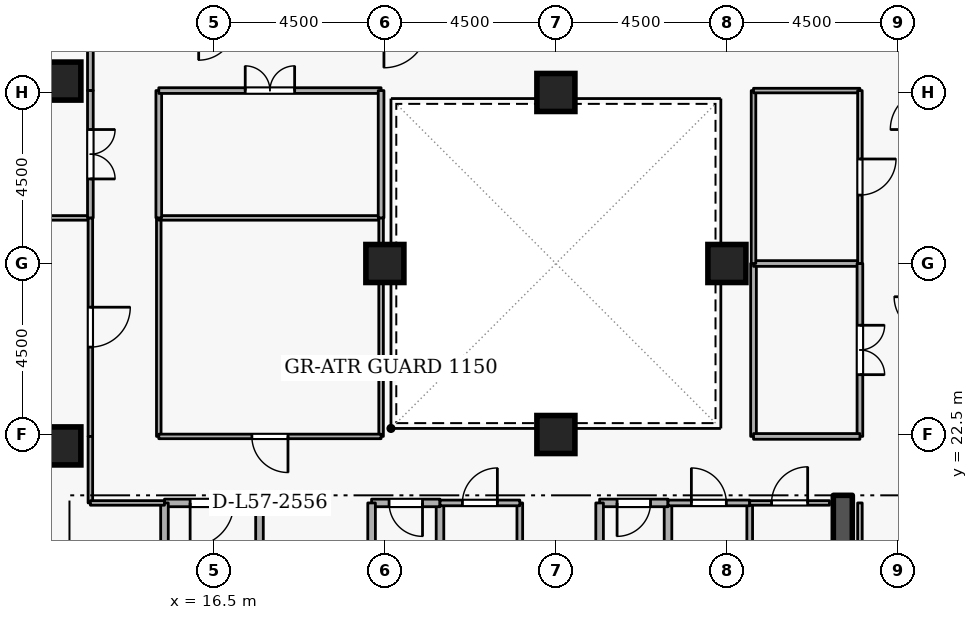
"""IFC4 building model, lengths in metres.
Left out: names, types, materials, properties, quantities, classifications, styles, units other than length and angle.
Written with IfcOpenShell. Run it as: python <this file> out.ifc"""

import sys

from ifc_helpers import new_model, si_unit, direction, frame, frame_2d, origin, origin_2d, place, context, subcontext, project, spatial, rectangle, extrude, element, fill, save


model = new_model("IFC4")
c1 = context("Model", 3, precision=1e-05, world=origin(), true_north=direction((0.0, 1.0)))
c2 = subcontext(c1, "Body", "Model", "MODEL_VIEW")
j1 = project(units=[si_unit("LENGTHUNIT", "METRE"), si_unit("PLANEANGLEUNIT", "RADIAN")], contexts=[c1])
p1 = place(None, origin())
s1 = spatial("IfcSite", under=j1, at=p1, CompositionType="ELEMENT")
p2 = place(p1, origin())
s2 = spatial("IfcBuilding", under=s1, at=p2, CompositionType="ELEMENT")
p3 = place(p2, frame((0.0, 0.0, 214.5)))
s3 = spatial("IfcBuildingStorey", under=s2, at=p3, CompositionType="ELEMENT", Elevation=214.5)
p4 = place(p3, frame((33.05, 15.1, 0.0), z_axis=(0.0, 0.0, 1.0), x_axis=(0.0, 1.0, 0.0)))
e1 = element("IfcWall", 1, at=p4, inside=s3, PredefinedType="SHEAR", context=c2, shape_type="SweptSolid", body=[
    extrude(rectangle(XDim=5.8, YDim=0.5, at=frame_2d((2.9, 0.0))), origin(), (0.0, 0.0, 1.0), 3.6),
])
for number, where, z_axis, x_axis in (
    (2, (12.5, 22.2, 0.0), (0.0, 0.0, 1.0), (1.0, 0.0, 0.0)),
    (3, (12.5, 31.8, 0.0), (0.0, 0.0, 1.0), (1.0, 0.0, 0.0)),
    (4, (25.5, 22.5, 0.0), (0.0, 0.0, 1.0), (1.0, 0.0, 0.0)),
    (5, (25.5, 31.5, 0.0), (0.0, 0.0, 1.0), (1.0, 0.0, 0.0)),
    (6, (21.0, 27.0, 0.0), (0.0, 0.0, 1.0), (1.0, 0.0, 0.0)),
    (7, (30.0, 27.0, 0.0), (0.0, 0.0, 1.0), (1.0, 0.0, 0.0)),
):
    element("IfcColumn", number, at=place(p3, frame(where, z_axis=z_axis, x_axis=x_axis)), inside=s3, PredefinedType="COLUMN", context=c2, shape_type="SweptSolid", body=[
        extrude(rectangle(XDim=1.0, YDim=1.0, at=origin_2d()), origin(), (0.0, 0.0, 1.0), 3.6),
    ])
p5 = place(p3, frame((17.7, 18.4, 0.0), z_axis=(0.0, 0.0, 1.0), x_axis=(0.0, 1.0, 0.0)))
e8 = element("IfcWall", 8, at=p5, inside=s3, PredefinedType="STANDARD", context=c2, shape_type="SweptSolid", body=[
    extrude(rectangle(XDim=2.3, YDim=0.2, at=frame_2d((1.15, 0.0))), origin(), (0.0, 0.0, 1.0), 2.545),
])
p6 = place(p3, frame((17.7, 20.7, 0.0), z_axis=(0.0, 0.0, 1.0), x_axis=(-1.0, 0.0, 0.0)))
e9 = element("IfcWall", 9, at=p6, inside=s3, PredefinedType="STANDARD", context=c2, shape_type="SweptSolid", body=[
    extrude(rectangle(XDim=2.5, YDim=0.2, at=frame_2d((1.25, 0.0))), origin(), (0.0, 0.0, 1.0), 3.34),
])
p7 = place(p6, frame((0.675, 0.0, 0.0)))
e10 = element("IfcOpeningElement", 10, at=p7, cuts=e9, PredefinedType="OPENING", context=c2, shape_type="SweptSolid", body=[
    extrude(rectangle(XDim=1.15, YDim=2.1, at=frame_2d((0.575, 1.05))), frame((0.0, 0.11, 0.0), z_axis=(0.0, -1.0, 0.0), x_axis=(1.0, 0.0, 0.0)), (0.0, 0.0, 1.0), 0.22),
])
p8 = place(p3, frame((15.2, 20.7, 0.0), z_axis=(0.0, 0.0, 1.0), x_axis=(0.0, -1.0, 0.0)))
e11 = element("IfcWall", 11, at=p8, inside=s3, PredefinedType="STANDARD", context=c2, shape_type="SweptSolid", body=[
    extrude(rectangle(XDim=5.7, YDim=0.2, at=frame_2d((2.85, 0.0))), origin(), (0.0, 0.0, 1.0), 3.34),
])
p9 = place(p3, frame((28.45, 18.65, 0.0), z_axis=(0.0, 0.0, 1.0), x_axis=(0.0, 1.0, 0.0)))
e12 = element("IfcWall", 12, at=p9, inside=s3, PredefinedType="STANDARD", context=c2, shape_type="SweptSolid", body=[
    extrude(rectangle(XDim=2.05, YDim=0.2, at=frame_2d((1.025, 0.0))), origin(), (0.0, 0.0, 1.0), 3.34),
])
p10 = place(p3, frame((28.45, 20.7, 0.0), z_axis=(0.0, 0.0, 1.0), x_axis=(-1.0, 0.0, 0.0)))
e13 = element("IfcWall", 13, at=p10, inside=s3, PredefinedType="STANDARD", context=c2, shape_type="SweptSolid", body=[
    extrude(rectangle(XDim=1.8, YDim=0.2, at=frame_2d((0.9, 0.0))), origin(), (0.0, 0.0, 1.0), 3.34),
])
p11 = place(p10, frame((0.46, 0.0, 0.0)))
e14 = element("IfcOpeningElement", 14, at=p11, cuts=e13, PredefinedType="OPENING", context=c2, shape_type="SweptSolid", body=[
    extrude(rectangle(XDim=0.88, YDim=2.04, at=frame_2d((0.44, 1.02))), frame((0.0, 0.11, 0.0), z_axis=(0.0, -1.0, 0.0), x_axis=(1.0, 0.0, 0.0)), (0.0, 0.0, 1.0), 0.22),
])
for number, where, z_axis, x_axis in (
    (15, (26.65, 20.7, 0.0), (0.0, 0.0, 1.0), (0.0, -1.0, 0.0)),
    (16, (22.45, 18.65, 0.0), (0.0, 0.0, 1.0), (0.0, 1.0, 0.0)),
):
    element("IfcWall", number, at=place(p3, frame(where, z_axis=z_axis, x_axis=x_axis)), inside=s3, PredefinedType="STANDARD", context=c2, shape_type="SweptSolid", body=[
        extrude(rectangle(XDim=2.05, YDim=0.2, at=frame_2d((1.025, 0.0))), origin(), (0.0, 0.0, 1.0), 3.34),
    ])
p12 = place(p3, frame((22.45, 20.7, 0.0), z_axis=(0.0, 0.0, 1.0), x_axis=(-1.0, 0.0, 0.0)))
e17 = element("IfcWall", 17, at=p12, inside=s3, PredefinedType="STANDARD", context=c2, shape_type="SweptSolid", body=[
    extrude(rectangle(XDim=1.8, YDim=0.2, at=frame_2d((0.9, 0.0))), origin(), (0.0, 0.0, 1.0), 3.34),
])
p13 = place(p12, frame((0.46, 0.0, 0.0)))
e18 = element("IfcOpeningElement", 18, at=p13, cuts=e17, PredefinedType="OPENING", context=c2, shape_type="SweptSolid", body=[
    extrude(rectangle(XDim=0.88, YDim=2.04, at=frame_2d((0.44, 1.02))), frame((0.0, 0.11, 0.0), z_axis=(0.0, -1.0, 0.0), x_axis=(1.0, 0.0, 0.0)), (0.0, 0.0, 1.0), 0.22),
])
p14 = place(p3, frame((20.65, 20.7, 0.0), z_axis=(0.0, 0.0, 1.0), x_axis=(0.0, -1.0, 0.0)))
e19 = element("IfcWall", 19, at=p14, inside=s3, PredefinedType="STANDARD", context=c2, shape_type="SweptSolid", body=[
    extrude(rectangle(XDim=2.05, YDim=0.2, at=frame_2d((1.025, 0.0))), origin(), (0.0, 0.0, 1.0), 3.34),
])
p15 = place(p3, frame((24.55, 20.7, 0.0), z_axis=(0.0, 0.0, 1.0), x_axis=(0.0, -1.0, 0.0)))
e20 = element("IfcWall", 20, at=p15, inside=s3, PredefinedType="PARTITIONING", context=c2, shape_type="SweptSolid", body=[
    extrude(rectangle(XDim=2.05, YDim=0.15, at=frame_2d((1.025, 0.0))), origin(), (0.0, 0.0, 1.0), 3.34),
])
p16 = place(p3, frame((22.45, 20.7, 0.0), z_axis=(0.0, 0.0, 1.0), x_axis=(1.0, 0.0, 0.0)))
e21 = element("IfcWall", 21, at=p16, inside=s3, PredefinedType="PARTITIONING", context=c2, shape_type="SweptSolid", body=[
    extrude(rectangle(XDim=2.1, YDim=0.15, at=frame_2d((1.05, 0.0))), origin(), (0.0, 0.0, 1.0), 3.34),
])
p17 = place(p16, frame((0.59, 0.0, 0.0)))
e22 = element("IfcOpeningElement", 22, at=p17, cuts=e21, PredefinedType="OPENING", context=c2, shape_type="SweptSolid", body=[
    extrude(rectangle(XDim=0.92, YDim=2.08, at=frame_2d((0.46, 1.04))), frame((0.0, 0.085, 0.0), z_axis=(0.0, -1.0, 0.0), x_axis=(1.0, 0.0, 0.0)), (0.0, 0.0, 1.0), 0.17),
])
p18 = place(p3, frame((30.6, 20.7, 0.0), z_axis=(0.0, 0.0, 1.0), x_axis=(0.0, -1.0, 0.0)))
e23 = element("IfcWall", 23, at=p18, inside=s3, PredefinedType="PARTITIONING", context=c2, shape_type="SweptSolid", body=[
    extrude(rectangle(XDim=2.05, YDim=0.15, at=frame_2d((1.025, 0.0))), origin(), (0.0, 0.0, 1.0), 3.34),
])
p19 = place(p3, frame((28.45, 20.7, 0.0), z_axis=(0.0, 0.0, 1.0), x_axis=(1.0, 0.0, 0.0)))
e24 = element("IfcWall", 24, at=p19, inside=s3, PredefinedType="PARTITIONING", context=c2, shape_type="SweptSolid", body=[
    extrude(rectangle(XDim=2.15, YDim=0.15, at=frame_2d((1.075, 0.0))), origin(), (0.0, 0.0, 1.0), 3.34),
])
p20 = place(p19, frame((0.615, 0.0, 0.0)))
e25 = element("IfcOpeningElement", 25, at=p20, cuts=e24, PredefinedType="OPENING", context=c2, shape_type="SweptSolid", body=[
    extrude(rectangle(XDim=0.92, YDim=2.08, at=frame_2d((0.46, 1.04))), frame((0.0, 0.085, 0.0), z_axis=(0.0, -1.0, 0.0), x_axis=(1.0, 0.0, 0.0)), (0.0, 0.0, 1.0), 0.17),
])
p21 = place(p3, frame((30.6, 20.7, 0.0), z_axis=(0.0, 0.0, 1.0), x_axis=(1.0, 0.0, 0.0)))
e26 = element("IfcWall", 26, at=p21, inside=s3, PredefinedType="PARTITIONING", context=c2, shape_type="SweptSolid", body=[
    extrude(rectangle(XDim=2.1, YDim=0.12, at=frame_2d((1.05, 0.0))), origin(), (0.0, 0.0, 1.0), 3.34),
])
p22 = place(p21, frame((0.575, 0.0, 0.0)))
e27 = element("IfcOpeningElement", 27, at=p22, cuts=e26, PredefinedType="OPENING", context=c2, shape_type="SweptSolid", body=[
    extrude(rectangle(XDim=0.95, YDim=2.1, at=frame_2d((0.475, 1.05))), frame((0.0, 0.07, 0.0), z_axis=(0.0, -1.0, 0.0), x_axis=(1.0, 0.0, 0.0)), (0.0, 0.0, 1.0), 0.14),
])
p23 = place(p3, frame((33.5, 20.7, 0.0), z_axis=(0.0, 0.0, 1.0), x_axis=(0.0, -1.0, 0.0)))
e28 = element("IfcWall", 28, at=p23, inside=s3, PredefinedType="PARTITIONING", context=c2, shape_type="SweptSolid", body=[
    extrude(rectangle(XDim=5.9, YDim=0.12, at=frame_2d((2.95, 0.0))), origin(), (0.0, 0.0, 1.0), 3.34),
])
p24 = place(p3, frame((1.78, 28.2, 0.0), z_axis=(0.0, 0.0, 1.0), x_axis=(1.0, 0.0, 0.0)))
e29 = element("IfcWall", 29, at=p24, inside=s3, PredefinedType="PARTITIONING", context=c2, shape_type="SweptSolid", body=[
    extrude(rectangle(XDim=11.47, YDim=0.12, at=frame_2d((5.735, 0.0))), origin(), (0.0, 0.0, 1.0), 3.34),
])
p25 = place(p3, frame((13.25, 28.2, 0.0), z_axis=(0.0, 0.0, 1.0), x_axis=(0.0, -1.0, 0.0)))
e30 = element("IfcWall", 30, at=p25, inside=s3, PredefinedType="PARTITIONING", context=c2, shape_type="SweptSolid", body=[
    extrude(rectangle(XDim=5.75, YDim=0.12, at=frame_2d((2.875, 0.0))), origin(), (0.0, 0.0, 1.0), 3.34),
])
p26 = place(p25, frame((2.35, 0.0, 0.0)))
e31 = element("IfcOpeningElement", 31, at=p26, cuts=e30, PredefinedType="OPENING", context=c2, shape_type="SweptSolid", body=[
    extrude(rectangle(XDim=1.05, YDim=2.1, at=frame_2d((0.525, 1.05))), frame((0.0, 0.07, 0.0), z_axis=(0.0, -1.0, 0.0), x_axis=(1.0, 0.0, 0.0)), (0.0, 0.0, 1.0), 0.14),
])
p27 = place(p3, frame((13.25, 22.45, 0.0), z_axis=(0.0, 0.0, 1.0), x_axis=(0.0, -1.0, 0.0)))
e32 = element("IfcWall", 32, at=p27, inside=s3, PredefinedType="PARTITIONING", context=c2, shape_type="SweptSolid", body=[
    extrude(rectangle(XDim=1.75, YDim=0.12, at=frame_2d((0.875, 0.0))), origin(), (0.0, 0.0, 1.0), 3.34),
])
p28 = place(p3, frame((13.25, 20.7, 0.0), z_axis=(0.0, 0.0, 1.0), x_axis=(1.0, 0.0, 0.0)))
e33 = element("IfcWall", 33, at=p28, inside=s3, PredefinedType="PARTITIONING", context=c2, shape_type="SweptSolid", body=[
    extrude(rectangle(XDim=1.95, YDim=0.12, at=frame_2d((0.975, 0.0))), origin(), (0.0, 0.0, 1.0), 3.34),
])
p29 = place(p3, frame((13.25, 33.3, 0.0), z_axis=(0.0, 0.0, 1.0), x_axis=(0.0, -1.0, 0.0)))
e34 = element("IfcWall", 34, at=p29, inside=s3, PredefinedType="PARTITIONING", context=c2, shape_type="SweptSolid", body=[
    extrude(rectangle(XDim=1.75, YDim=0.15, at=frame_2d((0.875, 0.0))), origin(), (0.0, 0.0, 1.0), 3.34),
])
p30 = place(p3, frame((13.25, 31.55, 0.0), z_axis=(0.0, 0.0, 1.0), x_axis=(0.0, -1.0, 0.0)))
e35 = element("IfcWall", 35, at=p30, inside=s3, PredefinedType="PARTITIONING", context=c2, shape_type="SweptSolid", body=[
    extrude(rectangle(XDim=3.35, YDim=0.15, at=frame_2d((1.675, 0.0))), origin(), (0.0, 0.0, 1.0), 3.34),
])
p31 = place(p30, frame((1.025, 0.0, 0.0)))
e36 = element("IfcOpeningElement", 36, at=p31, cuts=e35, PredefinedType="OPENING", context=c2, shape_type="SweptSolid", body=[
    extrude(rectangle(XDim=1.3, YDim=2.12, at=frame_2d((0.65, 1.06))), frame((0.0, 0.085, 0.0), z_axis=(0.0, -1.0, 0.0), x_axis=(1.0, 0.0, 0.0)), (0.0, 0.0, 1.0), 0.17),
])
p32 = place(p3, frame((15.05, 22.45, 0.0), z_axis=(0.0, 0.0, 1.0), x_axis=(0.0, 1.0, 0.0)))
e37 = element("IfcWall", 37, at=p32, inside=s3, PredefinedType="PARTITIONING", context=c2, shape_type="SweptSolid", body=[
    extrude(rectangle(XDim=5.75, YDim=0.12, at=frame_2d((2.875, 0.0))), origin(), (0.0, 0.0, 1.0), 3.34),
])
p33 = place(p3, frame((15.05, 28.2, 0.0), z_axis=(0.0, 0.0, 1.0), x_axis=(1.0, 0.0, 0.0)))
e38 = element("IfcWall", 38, at=p33, inside=s3, PredefinedType="PARTITIONING", context=c2, shape_type="SweptSolid", body=[
    extrude(rectangle(XDim=5.85, YDim=0.12, at=frame_2d((2.925, 0.0))), origin(), (0.0, 0.0, 1.0), 3.34),
])
p34 = place(p3, frame((20.9, 28.2, 0.0), z_axis=(0.0, 0.0, 1.0), x_axis=(0.0, -1.0, 0.0)))
e39 = element("IfcWall", 39, at=p34, inside=s3, PredefinedType="PARTITIONING", context=c2, shape_type="SweptSolid", body=[
    extrude(rectangle(XDim=5.75, YDim=0.12, at=frame_2d((2.875, 0.0))), origin(), (0.0, 0.0, 1.0), 3.34),
])
p35 = place(p3, frame((20.9, 22.45, 0.0), z_axis=(0.0, 0.0, 1.0), x_axis=(-1.0, 0.0, 0.0)))
e40 = element("IfcWall", 40, at=p35, inside=s3, PredefinedType="PARTITIONING", context=c2, shape_type="SweptSolid", body=[
    extrude(rectangle(XDim=5.85, YDim=0.12, at=frame_2d((2.925, 0.0))), origin(), (0.0, 0.0, 1.0), 3.34),
])
p36 = place(p35, frame((2.45, 0.0, 0.0)))
e41 = element("IfcOpeningElement", 41, at=p36, cuts=e40, PredefinedType="OPENING", context=c2, shape_type="SweptSolid", body=[
    extrude(rectangle(XDim=0.95, YDim=2.1, at=frame_2d((0.475, 1.05))), frame((0.0, 0.07, 0.0), z_axis=(0.0, -1.0, 0.0), x_axis=(1.0, 0.0, 0.0)), (0.0, 0.0, 1.0), 0.14),
])
p37 = place(p3, frame((15.05, 28.2, 0.0), z_axis=(0.0, 0.0, 1.0), x_axis=(0.0, 1.0, 0.0)))
e42 = element("IfcWall", 42, at=p37, inside=s3, PredefinedType="PARTITIONING", context=c2, shape_type="SweptSolid", body=[
    extrude(rectangle(XDim=3.35, YDim=0.15, at=frame_2d((1.675, 0.0))), origin(), (0.0, 0.0, 1.0), 3.34),
])
p38 = place(p3, frame((15.05, 31.55, 0.0), z_axis=(0.0, 0.0, 1.0), x_axis=(1.0, 0.0, 0.0)))
e43 = element("IfcWall", 43, at=p38, inside=s3, PredefinedType="PARTITIONING", context=c2, shape_type="SweptSolid", body=[
    extrude(rectangle(XDim=5.85, YDim=0.15, at=frame_2d((2.925, 0.0))), origin(), (0.0, 0.0, 1.0), 3.34),
])
p39 = place(p38, frame((2.275, 0.0, 0.0)))
e44 = element("IfcOpeningElement", 44, at=p39, cuts=e43, PredefinedType="OPENING", context=c2, shape_type="SweptSolid", body=[
    extrude(rectangle(XDim=1.3, YDim=2.12, at=frame_2d((0.65, 1.06))), frame((0.0, 0.085, 0.0), z_axis=(0.0, -1.0, 0.0), x_axis=(1.0, 0.0, 0.0)), (0.0, 0.0, 1.0), 0.17),
])
p40 = place(p3, frame((20.9, 31.55, 0.0), z_axis=(0.0, 0.0, 1.0), x_axis=(0.0, -1.0, 0.0)))
e45 = element("IfcWall", 45, at=p40, inside=s3, PredefinedType="PARTITIONING", context=c2, shape_type="SweptSolid", body=[
    extrude(rectangle(XDim=3.35, YDim=0.15, at=frame_2d((1.675, 0.0))), origin(), (0.0, 0.0, 1.0), 3.34),
])
p41 = place(p3, frame((30.7, 22.45, 0.0), z_axis=(0.0, 0.0, 1.0), x_axis=(0.0, 1.0, 0.0)))
e46 = element("IfcWall", 46, at=p41, inside=s3, PredefinedType="PARTITIONING", context=c2, shape_type="SweptSolid", body=[
    extrude(rectangle(XDim=4.55, YDim=0.15, at=frame_2d((2.275, 0.0))), origin(), (0.0, 0.0, 1.0), 3.34),
])
p42 = place(p3, frame((30.7, 27.0, 0.0), z_axis=(0.0, 0.0, 1.0), x_axis=(1.0, 0.0, 0.0)))
e47 = element("IfcWall", 47, at=p42, inside=s3, PredefinedType="PARTITIONING", context=c2, shape_type="SweptSolid", body=[
    extrude(rectangle(XDim=2.8, YDim=0.15, at=frame_2d((1.4, 0.0))), origin(), (0.0, 0.0, 1.0), 2.878),
])
p43 = place(p3, frame((33.5, 27.0, 0.0), z_axis=(0.0, 0.0, 1.0), x_axis=(0.0, -1.0, 0.0)))
e48 = element("IfcWall", 48, at=p43, inside=s3, PredefinedType="PARTITIONING", context=c2, shape_type="SweptSolid", body=[
    extrude(rectangle(XDim=4.55, YDim=0.15, at=frame_2d((2.275, 0.0))), origin(), (0.0, 0.0, 1.0), 3.34),
])
p44 = place(p43, frame((1.625, 0.0, 0.0)))
e49 = element("IfcOpeningElement", 49, at=p44, cuts=e48, PredefinedType="OPENING", context=c2, shape_type="SweptSolid", body=[
    extrude(rectangle(XDim=1.3, YDim=2.12, at=frame_2d((0.65, 1.06))), frame((0.0, 0.085, 0.0), z_axis=(0.0, -1.0, 0.0), x_axis=(1.0, 0.0, 0.0)), (0.0, 0.0, 1.0), 0.17),
])
p45 = place(p3, frame((33.5, 22.45, 0.0), z_axis=(0.0, 0.0, 1.0), x_axis=(-1.0, 0.0, 0.0)))
e50 = element("IfcWall", 50, at=p45, inside=s3, PredefinedType="PARTITIONING", context=c2, shape_type="SweptSolid", body=[
    extrude(rectangle(XDim=2.8, YDim=0.15, at=frame_2d((1.4, 0.0))), origin(), (0.0, 0.0, 1.0), 3.34),
])
p46 = place(p3, frame((30.7, 27.0, 0.0), z_axis=(0.0, 0.0, 1.0), x_axis=(0.0, 1.0, 0.0)))
e51 = element("IfcWall", 51, at=p46, inside=s3, PredefinedType="PARTITIONING", context=c2, shape_type="SweptSolid", body=[
    extrude(rectangle(XDim=4.55, YDim=0.12, at=frame_2d((2.275, 0.0))), origin(), (0.0, 0.0, 1.0), 3.34),
])
p47 = place(p3, frame((30.7, 31.55, 0.0), z_axis=(0.0, 0.0, 1.0), x_axis=(1.0, 0.0, 0.0)))
e52 = element("IfcWall", 52, at=p47, inside=s3, PredefinedType="PARTITIONING", context=c2, shape_type="SweptSolid", body=[
    extrude(rectangle(XDim=2.8, YDim=0.12, at=frame_2d((1.4, 0.0))), origin(), (0.0, 0.0, 1.0), 3.34),
])
p48 = place(p3, frame((33.5, 31.55, 0.0), z_axis=(0.0, 0.0, 1.0), x_axis=(0.0, -1.0, 0.0)))
e53 = element("IfcWall", 53, at=p48, inside=s3, PredefinedType="PARTITIONING", context=c2, shape_type="SweptSolid", body=[
    extrude(rectangle(XDim=4.55, YDim=0.12, at=frame_2d((2.275, 0.0))), origin(), (0.0, 0.0, 1.0), 3.34),
])
p49 = place(p48, frame((1.8, 0.0, 0.0)))
e54 = element("IfcOpeningElement", 54, at=p49, cuts=e53, PredefinedType="OPENING", context=c2, shape_type="SweptSolid", body=[
    extrude(rectangle(XDim=0.95, YDim=2.1, at=frame_2d((0.475, 1.05))), frame((0.0, 0.07, 0.0), z_axis=(0.0, -1.0, 0.0), x_axis=(1.0, 0.0, 0.0)), (0.0, 0.0, 1.0), 0.14),
])
p50 = place(p7, origin())
e55 = element("IfcDoor", 55, at=p50, inside=s3, OperationType="SINGLE_SWING_RIGHT", PredefinedType="DOOR", context=c2, shape_type="SweptSolid", body=[
    extrude(rectangle(XDim=1.15, YDim=2.1, at=frame_2d((0.575, 1.05))), frame((0.0, 0.025, 0.0), z_axis=(0.0, -1.0, 0.0), x_axis=(1.0, 0.0, 0.0)), (0.0, 0.0, 1.0), 0.05),
])
fill(e10, e55)
p51 = place(p11, origin())
e56 = element("IfcDoor", 56, at=p51, inside=s3, OperationType="SINGLE_SWING_RIGHT", PredefinedType="DOOR", context=c2, shape_type="SweptSolid", body=[
    extrude(rectangle(XDim=0.88, YDim=2.04, at=frame_2d((0.44, 1.02))), frame((0.0, 0.025, 0.0), z_axis=(0.0, -1.0, 0.0), x_axis=(1.0, 0.0, 0.0)), (0.0, 0.0, 1.0), 0.05),
])
fill(e14, e56)
p52 = place(p13, origin())
e57 = element("IfcDoor", 57, at=p52, inside=s3, OperationType="SINGLE_SWING_LEFT", PredefinedType="DOOR", context=c2, shape_type="SweptSolid", body=[
    extrude(rectangle(XDim=0.88, YDim=2.04, at=frame_2d((0.44, 1.02))), frame((0.0, 0.025, 0.0), z_axis=(0.0, -1.0, 0.0), x_axis=(1.0, 0.0, 0.0)), (0.0, 0.0, 1.0), 0.05),
])
fill(e18, e57)
p53 = place(p17, origin())
e58 = element("IfcDoor", 58, at=p53, inside=s3, OperationType="SINGLE_SWING_RIGHT", PredefinedType="DOOR", context=c2, shape_type="SweptSolid", body=[
    extrude(rectangle(XDim=0.92, YDim=2.08, at=frame_2d((0.46, 1.04))), frame((0.0, 0.025, 0.0), z_axis=(0.0, -1.0, 0.0), x_axis=(1.0, 0.0, 0.0)), (0.0, 0.0, 1.0), 0.05),
])
fill(e22, e58)
p54 = place(p20, origin())
e59 = element("IfcDoor", 59, at=p54, inside=s3, OperationType="SINGLE_SWING_LEFT", PredefinedType="DOOR", context=c2, shape_type="SweptSolid", body=[
    extrude(rectangle(XDim=0.92, YDim=2.08, at=frame_2d((0.46, 1.04))), frame((0.0, 0.025, 0.0), z_axis=(0.0, -1.0, 0.0), x_axis=(1.0, 0.0, 0.0)), (0.0, 0.0, 1.0), 0.05),
])
fill(e25, e59)
p55 = place(p22, origin())
e60 = element("IfcDoor", 60, at=p55, inside=s3, OperationType="SINGLE_SWING_RIGHT", PredefinedType="DOOR", context=c2, shape_type="SweptSolid", body=[
    extrude(rectangle(XDim=0.95, YDim=2.1, at=frame_2d((0.475, 1.05))), frame((0.0, 0.025, 0.0), z_axis=(0.0, -1.0, 0.0), x_axis=(1.0, 0.0, 0.0)), (0.0, 0.0, 1.0), 0.05),
])
fill(e27, e60)
p56 = place(p26, origin())
e61 = element("IfcDoor", 61, at=p56, inside=s3, OperationType="SINGLE_SWING_LEFT", PredefinedType="DOOR", context=c2, shape_type="SweptSolid", body=[
    extrude(rectangle(XDim=1.05, YDim=2.1, at=frame_2d((0.525, 1.05))), frame((0.0, 0.025, 0.0), z_axis=(0.0, -1.0, 0.0), x_axis=(1.0, 0.0, 0.0)), (0.0, 0.0, 1.0), 0.05),
])
fill(e31, e61)
p57 = place(p31, origin())
e62 = element("IfcDoor", 62, at=p57, inside=s3, OperationType="DOUBLE_DOOR_SINGLE_SWING", PredefinedType="DOOR", context=c2, shape_type="SweptSolid", body=[
    extrude(rectangle(XDim=1.3, YDim=2.12, at=frame_2d((0.65, 1.06))), frame((0.0, 0.025, 0.0), z_axis=(0.0, -1.0, 0.0), x_axis=(1.0, 0.0, 0.0)), (0.0, 0.0, 1.0), 0.05),
])
fill(e36, e62)
p58 = place(p36, origin())
e63 = element("IfcDoor", 63, at=p58, inside=s3, OperationType="SINGLE_SWING_LEFT", PredefinedType="DOOR", context=c2, shape_type="SweptSolid", body=[
    extrude(rectangle(XDim=0.95, YDim=2.1, at=frame_2d((0.475, 1.05))), frame((0.0, 0.025, 0.0), z_axis=(0.0, -1.0, 0.0), x_axis=(1.0, 0.0, 0.0)), (0.0, 0.0, 1.0), 0.05),
])
fill(e41, e63)
p59 = place(p39, origin())
e64 = element("IfcDoor", 64, at=p59, inside=s3, OperationType="DOUBLE_DOOR_SINGLE_SWING", PredefinedType="DOOR", context=c2, shape_type="SweptSolid", body=[
    extrude(rectangle(XDim=1.3, YDim=2.12, at=frame_2d((0.65, 1.06))), frame((0.0, 0.025, 0.0), z_axis=(0.0, -1.0, 0.0), x_axis=(1.0, 0.0, 0.0)), (0.0, 0.0, 1.0), 0.05),
])
fill(e44, e64)
p60 = place(p44, origin())
e65 = element("IfcDoor", 65, at=p60, inside=s3, OperationType="DOUBLE_DOOR_SINGLE_SWING", PredefinedType="DOOR", context=c2, shape_type="SweptSolid", body=[
    extrude(rectangle(XDim=1.3, YDim=2.12, at=frame_2d((0.65, 1.06))), frame((0.0, 0.025, 0.0), z_axis=(0.0, -1.0, 0.0), x_axis=(1.0, 0.0, 0.0)), (0.0, 0.0, 1.0), 0.05),
])
fill(e49, e65)
p61 = place(p49, origin())
e66 = element("IfcDoor", 66, at=p61, inside=s3, OperationType="SINGLE_SWING_LEFT", PredefinedType="DOOR", context=c2, shape_type="SweptSolid", body=[
    extrude(rectangle(XDim=0.95, YDim=2.1, at=frame_2d((0.475, 1.05))), frame((0.0, 0.025, 0.0), z_axis=(0.0, -1.0, 0.0), x_axis=(1.0, 0.0, 0.0)), (0.0, 0.0, 1.0), 0.05),
])
fill(e54, e66)
save(model, sys.argv[1])
